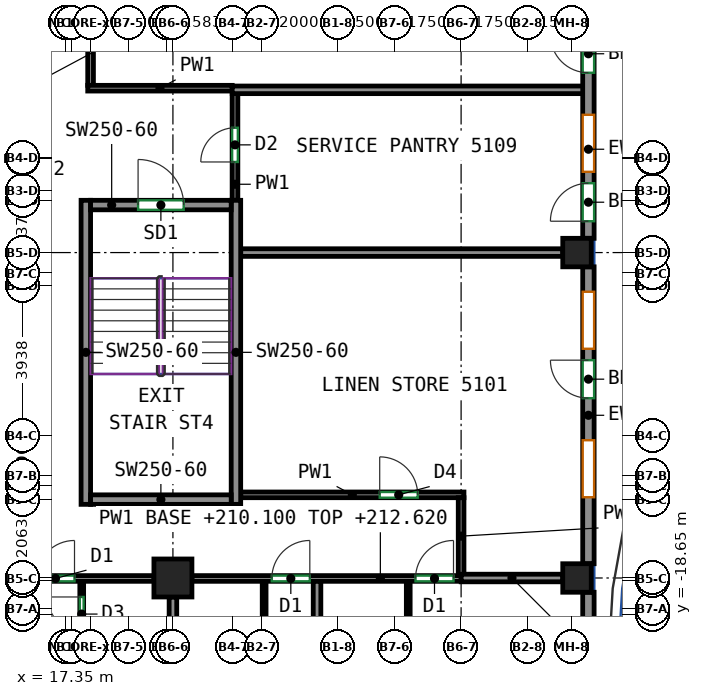
"""IFC4 building model, lengths in metres.
Left out: names, types, materials, properties, quantities, classifications, styles, units other than length and angle.
Written with IfcOpenShell. Run it as: python <this file> out.ifc"""

import sys

from ifc_helpers import new_model, si_unit, direction, frame, frame_2d, origin, origin_2d, place, context, subcontext, project, spatial, rectangle, extrude, source, transform, mapped, element, fill, save


model = new_model("IFC4")
c1 = context("Model", 3, precision=1e-05, world=origin(), true_north=direction((0.0, 1.0)))
c2 = subcontext(c1, "Body", "Model", "MODEL_VIEW")
j1 = project(units=[si_unit("LENGTHUNIT", "METRE"), si_unit("PLANEANGLEUNIT", "RADIAN")], contexts=[c1])
p1 = place(None, origin())
s1 = spatial("IfcSite", under=j1, at=p1, CompositionType="ELEMENT")
p2 = place(p1, origin())
s2 = spatial("IfcBuilding", under=s1, at=p2, CompositionType="ELEMENT")
p3 = place(p2, frame((0.0, 0.0, 210.1)))
s3 = spatial("IfcBuildingStorey", under=s2, at=p3, CompositionType="ELEMENT", Elevation=210.1)
m1 = source(origin(), c2, "Body", "SweptSolid", [
    extrude(rectangle(XDim=1.0, YDim=1.0, at=origin_2d()), origin(), (0.0, 0.0, 1.0), 3.12),
])
p4 = place(p3, frame((20.167, -17.688, 0.0), z_axis=(0.0, 0.0, 1.0), x_axis=(1.0, 0.0, 0.0)))
e1 = element("IfcColumn", 1, at=p4, inside=s3, PredefinedType="COLUMN", context=c2, shape_type="MappedRepresentation", body=[
    mapped(m1, transform((0.0, 0.0, 0.0))),
])
m2 = source(origin(), c2, "Body", "SweptSolid", [
    extrude(rectangle(XDim=0.75, YDim=0.75, at=origin_2d()), origin(), (0.0, 0.0, 1.0), 3.12),
])
for number, where, z_axis, x_axis in (
    (2, (30.8, -17.688, 0.0), (0.0, 0.0, 1.0), (1.0, 0.0, 0.0)),
    (3, (30.8, -9.125, 0.0), (0.0, 0.0, 1.0), (1.0, 0.0, 0.0)),
):
    element("IfcColumn", number, at=place(p3, frame(where, z_axis=z_axis, x_axis=x_axis)), inside=s3, PredefinedType="COLUMN", context=c2, shape_type="MappedRepresentation", body=[
        mapped(m2, transform((0.0, 0.0, 0.0))),
    ])
m3 = source(origin(), c2, "Body", "SweptSolid", [
    extrude(rectangle(XDim=8.0, YDim=0.25, at=frame_2d((4.0, 0.0))), origin(), (0.0, 0.0, 1.0), 3.12),
])
for number, where, z_axis, x_axis in (
    (4, (17.875, -15.75, 0.0), (0.0, 0.0, 1.0), (0.0, 1.0, 0.0)),
    (5, (21.825, -15.75, 0.0), (0.0, 0.0, 1.0), (0.0, 1.0, 0.0)),
):
    element("IfcWall", number, at=place(p3, frame(where, z_axis=z_axis, x_axis=x_axis)), inside=s3, PredefinedType="SHEAR", context=c2, shape_type="MappedRepresentation", body=[
        mapped(m3, transform((0.0, 0.0, 0.0))),
    ])
m4 = source(origin(), c2, "Body", "SweptSolid", [
    extrude(rectangle(XDim=3.7, YDim=0.25, at=frame_2d((1.85, 0.0))), origin(), (0.0, 0.0, 1.0), 3.12),
])
p5 = place(p3, frame((18.0, -15.625, 0.0), z_axis=(0.0, 0.0, 1.0), x_axis=(1.0, 0.0, 0.0)))
e6 = element("IfcWall", 6, at=p5, inside=s3, PredefinedType="SHEAR", context=c2, shape_type="MappedRepresentation", body=[
    mapped(m4, transform((0.0, 0.0, 0.0))),
])
p6 = place(p3, frame((18.0, -7.875, 0.0), z_axis=(0.0, 0.0, 1.0), x_axis=(1.0, 0.0, 0.0)))
e7 = element("IfcWall", 7, at=p6, inside=s3, PredefinedType="SHEAR", context=c2, shape_type="MappedRepresentation", body=[
    mapped(m4, transform((0.0, 0.0, 0.0))),
])
p7 = place(p6, frame((1.25, 0.0, 0.0)))
e8 = element("IfcOpeningElement", 8, at=p7, cuts=e7, PredefinedType="OPENING", context=c2, shape_type="SweptSolid", body=[
    extrude(rectangle(XDim=1.2, YDim=2.1, at=frame_2d((0.6, 1.05))), frame((0.0, 0.135, 0.0), z_axis=(0.0, -1.0, 0.0), x_axis=(1.0, 0.0, 0.0)), (0.0, 0.0, 1.0), 0.27),
])
m5 = source(origin(), c2, "Body", "SweptSolid", [
    extrude(rectangle(XDim=3.994, YDim=0.3, at=frame_2d((1.997, 0.0))), origin(), (0.0, 0.0, 1.0), 3.12),
])
p8 = place(p3, frame((31.1, -22.057, 0.0), z_axis=(0.0, 0.0, 1.0), x_axis=(0.0, 1.0, 0.0)))
e9 = element("IfcWall", 9, at=p8, inside=s3, PredefinedType="SOLIDWALL", context=c2, shape_type="MappedRepresentation", body=[
    mapped(m5, transform((0.0, 0.0, 0.0))),
])
p9 = place(p8, frame((1.75, 0.0, 0.85)))
e10 = element("IfcOpeningElement", 10, at=p9, cuts=e9, PredefinedType="OPENING", context=c2, shape_type="SweptSolid", body=[
    extrude(rectangle(XDim=1.5, YDim=1.95, at=frame_2d((0.75, 0.975))), frame((0.0, 0.16, 0.0), z_axis=(0.0, -1.0, 0.0), x_axis=(1.0, 0.0, 0.0)), (0.0, 0.0, 1.0), 0.32),
])
m6 = source(origin(), c2, "Body", "SweptSolid", [
    extrude(rectangle(XDim=7.812, YDim=0.3, at=frame_2d((3.906, 0.0))), origin(), (0.0, 0.0, 1.0), 3.12),
])
p10 = place(p3, frame((31.1, -17.312, 0.0), z_axis=(0.0, 0.0, 1.0), x_axis=(0.0, 1.0, 0.0)))
e11 = element("IfcWall", 11, at=p10, inside=s3, PredefinedType="SOLIDWALL", context=c2, shape_type="MappedRepresentation", body=[
    mapped(m6, transform((0.0, 0.0, 0.0))),
])
p11 = place(p10, frame((1.75, 0.0, 0.85)))
e12 = element("IfcOpeningElement", 12, at=p11, cuts=e11, PredefinedType="OPENING", context=c2, shape_type="SweptSolid", body=[
    extrude(rectangle(XDim=1.5, YDim=1.95, at=frame_2d((0.75, 0.975))), frame((0.0, 0.16, 0.0), z_axis=(0.0, -1.0, 0.0), x_axis=(1.0, 0.0, 0.0)), (0.0, 0.0, 1.0), 0.32),
])
p12 = place(p10, frame((5.656, 0.0, 0.85)))
e13 = element("IfcOpeningElement", 13, at=p12, cuts=e11, PredefinedType="OPENING", context=c2, shape_type="SweptSolid", body=[
    extrude(rectangle(XDim=1.5, YDim=1.95, at=frame_2d((0.75, 0.975))), frame((0.0, 0.16, 0.0), z_axis=(0.0, -1.0, 0.0), x_axis=(1.0, 0.0, 0.0)), (0.0, 0.0, 1.0), 0.32),
])
p13 = place(p10, frame((4.356, 0.0, 0.0)))
e14 = element("IfcOpeningElement", 14, at=p13, cuts=e11, PredefinedType="OPENING", context=c2, shape_type="SweptSolid", body=[
    extrude(rectangle(XDim=1.0, YDim=2.1, at=frame_2d((0.5, 1.05))), frame((0.0, 0.16, 0.0), z_axis=(0.0, -1.0, 0.0), x_axis=(1.0, 0.0, 0.0)), (0.0, 0.0, 1.0), 0.32),
])
p14 = place(p3, frame((31.1, -8.75, 0.0), z_axis=(0.0, 0.0, 1.0), x_axis=(0.0, 1.0, 0.0)))
e15 = element("IfcWall", 15, at=p14, inside=s3, PredefinedType="SOLIDWALL", context=c2, shape_type="MappedRepresentation", body=[
    mapped(m6, transform((0.0, 0.0, 0.0))),
])
p15 = place(p14, frame((1.75, 0.0, 0.85)))
e16 = element("IfcOpeningElement", 16, at=p15, cuts=e15, PredefinedType="OPENING", context=c2, shape_type="SweptSolid", body=[
    extrude(rectangle(XDim=1.5, YDim=1.95, at=frame_2d((0.75, 0.975))), frame((0.0, 0.16, 0.0), z_axis=(0.0, -1.0, 0.0), x_axis=(1.0, 0.0, 0.0)), (0.0, 0.0, 1.0), 0.32),
])
p16 = place(p14, frame((0.45, 0.0, 0.0)))
e17 = element("IfcOpeningElement", 17, at=p16, cuts=e15, PredefinedType="OPENING", context=c2, shape_type="SweptSolid", body=[
    extrude(rectangle(XDim=1.0, YDim=2.1, at=frame_2d((0.5, 1.05))), frame((0.0, 0.16, 0.0), z_axis=(0.0, -1.0, 0.0), x_axis=(1.0, 0.0, 0.0)), (0.0, 0.0, 1.0), 0.32),
])
p17 = place(p14, frame((5.656, 0.0, 0.85)))
e18 = element("IfcOpeningElement", 18, at=p17, cuts=e15, PredefinedType="OPENING", context=c2, shape_type="SweptSolid", body=[
    extrude(rectangle(XDim=1.5, YDim=1.95, at=frame_2d((0.75, 0.975))), frame((0.0, 0.16, 0.0), z_axis=(0.0, -1.0, 0.0), x_axis=(1.0, 0.0, 0.0)), (0.0, 0.0, 1.0), 0.32),
])
p18 = place(p14, frame((4.356, 0.0, 0.0)))
e19 = element("IfcOpeningElement", 19, at=p18, cuts=e15, PredefinedType="OPENING", context=c2, shape_type="SweptSolid", body=[
    extrude(rectangle(XDim=1.0, YDim=2.1, at=frame_2d((0.5, 1.05))), frame((0.0, 0.16, 0.0), z_axis=(0.0, -1.0, 0.0), x_axis=(1.0, 0.0, 0.0)), (0.0, 0.0, 1.0), 0.32),
])
p19 = place(p3, frame((13.083, -17.7, 0.0), z_axis=(0.0, 0.0, 1.0), x_axis=(1.0, 0.0, 0.0)))
e20 = element("IfcWall", 20, at=p19, inside=s3, PredefinedType="PARTITIONING", context=c2, shape_type="SweptSolid", body=[
    extrude(rectangle(XDim=6.584, YDim=0.15, at=frame_2d((3.292, 0.0))), origin(), (0.0, 0.0, 1.0), 3.12),
])
p20 = place(p19, frame((2.102, 0.0, 0.0)))
e21 = element("IfcOpeningElement", 21, at=p20, cuts=e20, PredefinedType="OPENING", context=c2, shape_type="SweptSolid", body=[
    extrude(rectangle(XDim=1.0, YDim=2.1, at=frame_2d((0.5, 1.05))), frame((0.0, 0.085, 0.0), z_axis=(0.0, -1.0, 0.0), x_axis=(1.0, 0.0, 0.0)), (0.0, 0.0, 1.0), 0.17),
])
p21 = place(p19, frame((3.494, 0.0, 0.0)))
e22 = element("IfcOpeningElement", 22, at=p21, cuts=e20, PredefinedType="OPENING", context=c2, shape_type="SweptSolid", body=[
    extrude(rectangle(XDim=1.0, YDim=2.1, at=frame_2d((0.5, 1.05))), frame((0.0, 0.085, 0.0), z_axis=(0.0, -1.0, 0.0), x_axis=(1.0, 0.0, 0.0)), (0.0, 0.0, 1.0), 0.17),
])
p22 = place(p3, frame((20.667, -17.7, 0.0), z_axis=(0.0, 0.0, 1.0), x_axis=(1.0, 0.0, 0.0)))
e23 = element("IfcWall", 23, at=p22, inside=s3, PredefinedType="PARTITIONING", context=c2, shape_type="SweptSolid", body=[
    extrude(rectangle(XDim=7.083, YDim=0.15, at=frame_2d((3.542, 0.0))), origin(), (0.0, 0.0, 1.0), 2.52),
])
p23 = place(p22, frame((2.102, 0.0, 0.0)))
e24 = element("IfcOpeningElement", 24, at=p23, cuts=e23, PredefinedType="OPENING", context=c2, shape_type="SweptSolid", body=[
    extrude(rectangle(XDim=1.0, YDim=2.1, at=frame_2d((0.5, 1.05))), frame((0.0, 0.085, 0.0), z_axis=(0.0, -1.0, 0.0), x_axis=(1.0, 0.0, 0.0)), (0.0, 0.0, 1.0), 0.17),
])
p24 = place(p22, frame((5.883, 0.0, 0.0)))
e25 = element("IfcOpeningElement", 25, at=p24, cuts=e23, PredefinedType="OPENING", context=c2, shape_type="SweptSolid", body=[
    extrude(rectangle(XDim=1.0, YDim=2.1, at=frame_2d((0.5, 1.05))), frame((0.0, 0.085, 0.0), z_axis=(0.0, -1.0, 0.0), x_axis=(1.0, 0.0, 0.0)), (0.0, 0.0, 1.0), 0.17),
])
p25 = place(p3, frame((18.0, -4.725, 0.0), z_axis=(0.0, 0.0, 1.0), x_axis=(0.0, 1.0, 0.0)))
e26 = element("IfcWall", 26, at=p25, inside=s3, PredefinedType="PARTITIONING", context=c2, shape_type="SweptSolid", body=[
    extrude(rectangle(XDim=8.35, YDim=0.15, at=frame_2d((4.175, 0.0))), origin(), (0.0, 0.0, 1.0), 3.12),
])
p26 = place(p25, frame((2.919, 0.0, 0.0)))
e27 = element("IfcOpeningElement", 27, at=p26, cuts=e26, PredefinedType="OPENING", context=c2, shape_type="SweptSolid", body=[
    extrude(rectangle(XDim=0.9, YDim=2.1, at=frame_2d((0.45, 1.05))), frame((0.0, 0.085, 0.0), z_axis=(0.0, -1.0, 0.0), x_axis=(1.0, 0.0, 0.0)), (0.0, 0.0, 1.0), 0.17),
])
p27 = place(p3, frame((17.925, -4.8, 0.0), z_axis=(0.0, 0.0, 1.0), x_axis=(1.0, 0.0, 0.0)))
e28 = element("IfcWall", 28, at=p27, inside=s3, PredefinedType="PARTITIONING", context=c2, shape_type="SweptSolid", body=[
    extrude(rectangle(XDim=3.802, YDim=0.15, at=frame_2d((1.901, 0.0))), origin(), (0.0, 0.0, 1.0), 3.12),
])
p28 = place(p3, frame((21.8, -7.75, 0.0), z_axis=(0.0, 0.0, 1.0), x_axis=(0.0, 1.0, 0.0)))
e29 = element("IfcWall", 29, at=p28, inside=s3, PredefinedType="PARTITIONING", context=c2, shape_type="SweptSolid", body=[
    extrude(rectangle(XDim=2.817, YDim=0.15, at=frame_2d((1.408, 0.0))), origin(), (0.0, 0.0, 1.0), 3.12),
])
p29 = place(p28, frame((1.009, 0.0, 0.0)))
e30 = element("IfcOpeningElement", 30, at=p29, cuts=e29, PredefinedType="OPENING", context=c2, shape_type="SweptSolid", body=[
    extrude(rectangle(XDim=0.9, YDim=2.1, at=frame_2d((0.45, 1.05))), frame((0.0, 0.085, 0.0), z_axis=(0.0, -1.0, 0.0), x_axis=(1.0, 0.0, 0.0)), (0.0, 0.0, 1.0), 0.17),
])
p30 = place(p3, frame((21.95, -15.5, 0.0), z_axis=(0.0, 0.0, 1.0), x_axis=(1.0, 0.0, 0.0)))
e31 = element("IfcWall", 31, at=p30, inside=s3, PredefinedType="PARTITIONING", context=c2, shape_type="SweptSolid", body=[
    extrude(rectangle(XDim=5.875, YDim=0.15, at=frame_2d((2.938, 0.0))), origin(), (0.0, 0.0, 1.0), 3.12),
])
p31 = place(p30, frame((3.658, 0.0, 0.0)))
e32 = element("IfcOpeningElement", 32, at=p31, cuts=e31, PredefinedType="OPENING", context=c2, shape_type="SweptSolid", body=[
    extrude(rectangle(XDim=1.0, YDim=2.1, at=frame_2d((0.5, 1.05))), frame((0.0, 0.085, 0.0), z_axis=(0.0, -1.0, 0.0), x_axis=(1.0, 0.0, 0.0)), (0.0, 0.0, 1.0), 0.17),
])
p32 = place(p3, frame((27.75, -17.598, 0.0), z_axis=(0.0, 0.0, 1.0), x_axis=(0.0, 1.0, 0.0)))
e33 = element("IfcWall", 33, at=p32, inside=s3, PredefinedType="PARTITIONING", context=c2, shape_type="SweptSolid", body=[
    extrude(rectangle(XDim=2.023, YDim=0.15, at=frame_2d((1.011, 0.0))), origin(), (0.0, 0.0, 1.0), 2.52),
])
p33 = place(p3, frame((17.767, -20.652, 0.0), z_axis=(0.0, 0.0, 1.0), x_axis=(0.0, 1.0, 0.0)))
e34 = element("IfcWall", 34, at=p33, inside=s3, PredefinedType="PARTITIONING", context=c2, shape_type="SweptSolid", body=[
    extrude(rectangle(XDim=2.875, YDim=0.1, at=frame_2d((1.438, 0.0))), origin(), (0.0, 0.0, 1.0), 3.12),
])
p34 = place(p33, frame((1.565, 0.0, 0.0)))
e35 = element("IfcOpeningElement", 35, at=p34, cuts=e34, PredefinedType="OPENING", context=c2, shape_type="SweptSolid", body=[
    extrude(rectangle(XDim=0.9, YDim=2.1, at=frame_2d((0.45, 1.05))), frame((0.0, 0.06, 0.0), z_axis=(0.0, -1.0, 0.0), x_axis=(1.0, 0.0, 0.0)), (0.0, 0.0, 1.0), 0.12),
])
p35 = place(p3, frame((20.167, -20.652, 0.0), z_axis=(0.0, 0.0, 1.0), x_axis=(0.0, 1.0, 0.0)))
e36 = element("IfcWall", 36, at=p35, inside=s3, PredefinedType="PARTITIONING", context=c2, shape_type="SweptSolid", body=[
    extrude(rectangle(XDim=2.464, YDim=0.2, at=frame_2d((1.232, 0.0))), origin(), (0.0, 0.0, 1.0), 3.12),
])
p36 = place(p3, frame((22.567, -17.777, 0.0), z_axis=(0.0, 0.0, 1.0), x_axis=(0.0, -1.0, 0.0)))
e37 = element("IfcWall", 37, at=p36, inside=s3, PredefinedType="PARTITIONING", context=c2, shape_type="SweptSolid", body=[
    extrude(rectangle(XDim=2.875, YDim=0.1, at=frame_2d((1.438, 0.0))), origin(), (0.0, 0.0, 1.0), 3.12),
])
p37 = place(p36, frame((1.67, 0.0, 0.0)))
e38 = element("IfcOpeningElement", 38, at=p37, cuts=e37, PredefinedType="OPENING", context=c2, shape_type="SweptSolid", body=[
    extrude(rectangle(XDim=0.9, YDim=2.1, at=frame_2d((0.45, 1.05))), frame((0.0, 0.06, 0.0), z_axis=(0.0, -1.0, 0.0), x_axis=(1.0, 0.0, 0.0)), (0.0, 0.0, 1.0), 0.12),
])
p38 = place(p3, frame((23.959, -20.648, 0.0), z_axis=(0.0, 0.0, 1.0), x_axis=(0.0, 1.0, 0.0)))
e39 = element("IfcWall", 39, at=p38, inside=s3, PredefinedType="PARTITIONING", context=c2, shape_type="SweptSolid", body=[
    extrude(rectangle(XDim=2.871, YDim=0.2, at=frame_2d((1.436, 0.0))), origin(), (0.0, 0.0, 1.0), 3.12),
])
p39 = place(p3, frame((26.359, -17.777, 0.0), z_axis=(0.0, 0.0, 1.0), x_axis=(0.0, -1.0, 0.0)))
e40 = element("IfcWall", 40, at=p39, inside=s3, PredefinedType="PARTITIONING", context=c2, shape_type="SweptSolid", body=[
    extrude(rectangle(XDim=2.861, YDim=0.1, at=frame_2d((1.43, 0.0))), origin(), (0.0, 0.0, 1.0), 3.12),
])
p40 = place(p39, frame((1.449, 0.0, 0.0)))
e41 = element("IfcOpeningElement", 41, at=p40, cuts=e40, PredefinedType="OPENING", context=c2, shape_type="SweptSolid", body=[
    extrude(rectangle(XDim=0.9, YDim=2.1, at=frame_2d((0.45, 1.05))), frame((0.0, 0.06, 0.0), z_axis=(0.0, -1.0, 0.0), x_axis=(1.0, 0.0, 0.0)), (0.0, 0.0, 1.0), 0.12),
])
p41 = place(p3, frame((27.752, -17.688, 0.0), z_axis=(0.0, 0.0, 1.0), x_axis=(1.0, 0.0, 0.0)))
e42 = element("IfcWall", 42, at=p41, inside=s3, PredefinedType="PARTITIONING", context=c2, shape_type="SweptSolid", body=[
    extrude(rectangle(XDim=2.673, YDim=0.2, at=frame_2d((1.336, 0.0))), origin(), (0.0, 0.0, 1.0), 2.52),
])
p42 = place(p3, frame((21.727, -4.843, 0.0), z_axis=(0.0, 0.0, 1.0), x_axis=(1.0, 0.0, 0.0)))
e43 = element("IfcWall", 43, at=p42, inside=s3, PredefinedType="PARTITIONING", context=c2, shape_type="SweptSolid", body=[
    extrude(rectangle(XDim=9.273, YDim=0.2, at=frame_2d((4.636, 0.0))), origin(), (0.0, 0.0, 1.0), 3.12),
])
p43 = place(p3, frame((21.95, -9.125, 0.0), z_axis=(0.0, 0.0, 1.0), x_axis=(1.0, 0.0, 0.0)))
e44 = element("IfcWall", 44, at=p43, inside=s3, PredefinedType="PARTITIONING", context=c2, shape_type="SweptSolid", body=[
    extrude(rectangle(XDim=8.475, YDim=0.2, at=frame_2d((4.238, 0.0))), origin(), (0.0, 0.0, 1.0), 3.12),
])
p44 = place(p11, origin())
e45 = element("IfcWindow", 45, at=p44, inside=s3, PartitioningType="SINGLE_PANEL", PredefinedType="WINDOW", context=c2, shape_type="SweptSolid", body=[
    extrude(rectangle(XDim=1.5, YDim=1.95, at=frame_2d((0.75, 0.975))), frame((0.0, 0.03, 0.0), z_axis=(0.0, -1.0, 0.0), x_axis=(1.0, 0.0, 0.0)), (0.0, 0.0, 1.0), 0.06),
])
fill(e12, e45)
p45 = place(p12, origin())
e46 = element("IfcWindow", 46, at=p45, inside=s3, PartitioningType="SINGLE_PANEL", PredefinedType="WINDOW", context=c2, shape_type="SweptSolid", body=[
    extrude(rectangle(XDim=1.5, YDim=1.95, at=frame_2d((0.75, 0.975))), frame((0.0, 0.03, 0.0), z_axis=(0.0, -1.0, 0.0), x_axis=(1.0, 0.0, 0.0)), (0.0, 0.0, 1.0), 0.06),
])
fill(e13, e46)
p46 = place(p13, origin())
e47 = element("IfcDoor", 47, at=p46, inside=s3, OperationType="SINGLE_SWING_RIGHT", PredefinedType="DOOR", context=c2, shape_type="SweptSolid", body=[
    extrude(rectangle(XDim=1.0, YDim=2.1, at=frame_2d((0.5, 1.05))), frame((0.0, 0.025, 0.0), z_axis=(0.0, -1.0, 0.0), x_axis=(1.0, 0.0, 0.0)), (0.0, 0.0, 1.0), 0.05),
])
fill(e14, e47)
p47 = place(p15, origin())
e48 = element("IfcWindow", 48, at=p47, inside=s3, PartitioningType="SINGLE_PANEL", PredefinedType="WINDOW", context=c2, shape_type="SweptSolid", body=[
    extrude(rectangle(XDim=1.5, YDim=1.95, at=frame_2d((0.75, 0.975))), frame((0.0, 0.03, 0.0), z_axis=(0.0, -1.0, 0.0), x_axis=(1.0, 0.0, 0.0)), (0.0, 0.0, 1.0), 0.06),
])
fill(e16, e48)
p48 = place(p16, origin())
e49 = element("IfcDoor", 49, at=p48, inside=s3, OperationType="SINGLE_SWING_LEFT", PredefinedType="DOOR", context=c2, shape_type="SweptSolid", body=[
    extrude(rectangle(XDim=1.0, YDim=2.1, at=frame_2d((0.5, 1.05))), frame((0.0, 0.025, 0.0), z_axis=(0.0, -1.0, 0.0), x_axis=(1.0, 0.0, 0.0)), (0.0, 0.0, 1.0), 0.05),
])
fill(e17, e49)
p49 = place(p18, origin())
e50 = element("IfcDoor", 50, at=p49, inside=s3, OperationType="SINGLE_SWING_RIGHT", PredefinedType="DOOR", context=c2, shape_type="SweptSolid", body=[
    extrude(rectangle(XDim=1.0, YDim=2.1, at=frame_2d((0.5, 1.05))), frame((0.0, 0.025, 0.0), z_axis=(0.0, -1.0, 0.0), x_axis=(1.0, 0.0, 0.0)), (0.0, 0.0, 1.0), 0.05),
])
fill(e19, e50)
p50 = place(p7, origin())
e51 = element("IfcDoor", 51, at=p50, inside=s3, OperationType="DOUBLE_DOOR_SINGLE_SWING", PredefinedType="DOOR", context=c2, shape_type="SweptSolid", body=[
    extrude(rectangle(XDim=1.2, YDim=2.1, at=frame_2d((0.6, 1.05))), frame((0.0, 0.025, 0.0), z_axis=(0.0, -1.0, 0.0), x_axis=(1.0, 0.0, 0.0)), (0.0, 0.0, 1.0), 0.05),
])
fill(e8, e51)
p51 = place(p34, origin())
e52 = element("IfcDoor", 52, at=p51, inside=s3, OperationType="SINGLE_SWING_RIGHT", PredefinedType="DOOR", context=c2, shape_type="SweptSolid", body=[
    extrude(rectangle(XDim=0.9, YDim=2.1, at=frame_2d((0.45, 1.05))), frame((0.0, 0.025, 0.0), z_axis=(0.0, -1.0, 0.0), x_axis=(1.0, 0.0, 0.0)), (0.0, 0.0, 1.0), 0.05),
])
fill(e35, e52)
p52 = place(p21, origin())
e53 = element("IfcDoor", 53, at=p52, inside=s3, OperationType="SINGLE_SWING_RIGHT", PredefinedType="DOOR", context=c2, shape_type="SweptSolid", body=[
    extrude(rectangle(XDim=1.0, YDim=2.1, at=frame_2d((0.5, 1.05))), frame((0.0, 0.025, 0.0), z_axis=(0.0, -1.0, 0.0), x_axis=(1.0, 0.0, 0.0)), (0.0, 0.0, 1.0), 0.05),
])
fill(e22, e53)
p53 = place(p23, origin())
e54 = element("IfcDoor", 54, at=p53, inside=s3, OperationType="SINGLE_SWING_RIGHT", PredefinedType="DOOR", context=c2, shape_type="SweptSolid", body=[
    extrude(rectangle(XDim=1.0, YDim=2.1, at=frame_2d((0.5, 1.05))), frame((0.0, 0.025, 0.0), z_axis=(0.0, -1.0, 0.0), x_axis=(1.0, 0.0, 0.0)), (0.0, 0.0, 1.0), 0.05),
])
fill(e24, e54)
p54 = place(p24, origin())
e55 = element("IfcDoor", 55, at=p54, inside=s3, OperationType="SINGLE_SWING_RIGHT", PredefinedType="DOOR", context=c2, shape_type="SweptSolid", body=[
    extrude(rectangle(XDim=1.0, YDim=2.1, at=frame_2d((0.5, 1.05))), frame((0.0, 0.025, 0.0), z_axis=(0.0, -1.0, 0.0), x_axis=(1.0, 0.0, 0.0)), (0.0, 0.0, 1.0), 0.05),
])
fill(e25, e55)
p55 = place(p31, origin())
e56 = element("IfcDoor", 56, at=p55, inside=s3, OperationType="SINGLE_SWING_LEFT", PredefinedType="DOOR", context=c2, shape_type="SweptSolid", body=[
    extrude(rectangle(XDim=1.0, YDim=2.1, at=frame_2d((0.5, 1.05))), frame((0.0, 0.025, 0.0), z_axis=(0.0, -1.0, 0.0), x_axis=(1.0, 0.0, 0.0)), (0.0, 0.0, 1.0), 0.05),
])
fill(e32, e56)
p56 = place(p29, origin())
e57 = element("IfcDoor", 57, at=p56, inside=s3, OperationType="SINGLE_SWING_LEFT", PredefinedType="DOOR", context=c2, shape_type="SweptSolid", body=[
    extrude(rectangle(XDim=0.9, YDim=2.1, at=frame_2d((0.45, 1.05))), frame((0.0, 0.025, 0.0), z_axis=(0.0, -1.0, 0.0), x_axis=(1.0, 0.0, 0.0)), (0.0, 0.0, 1.0), 0.05),
])
fill(e30, e57)
save(model, sys.argv[1])
